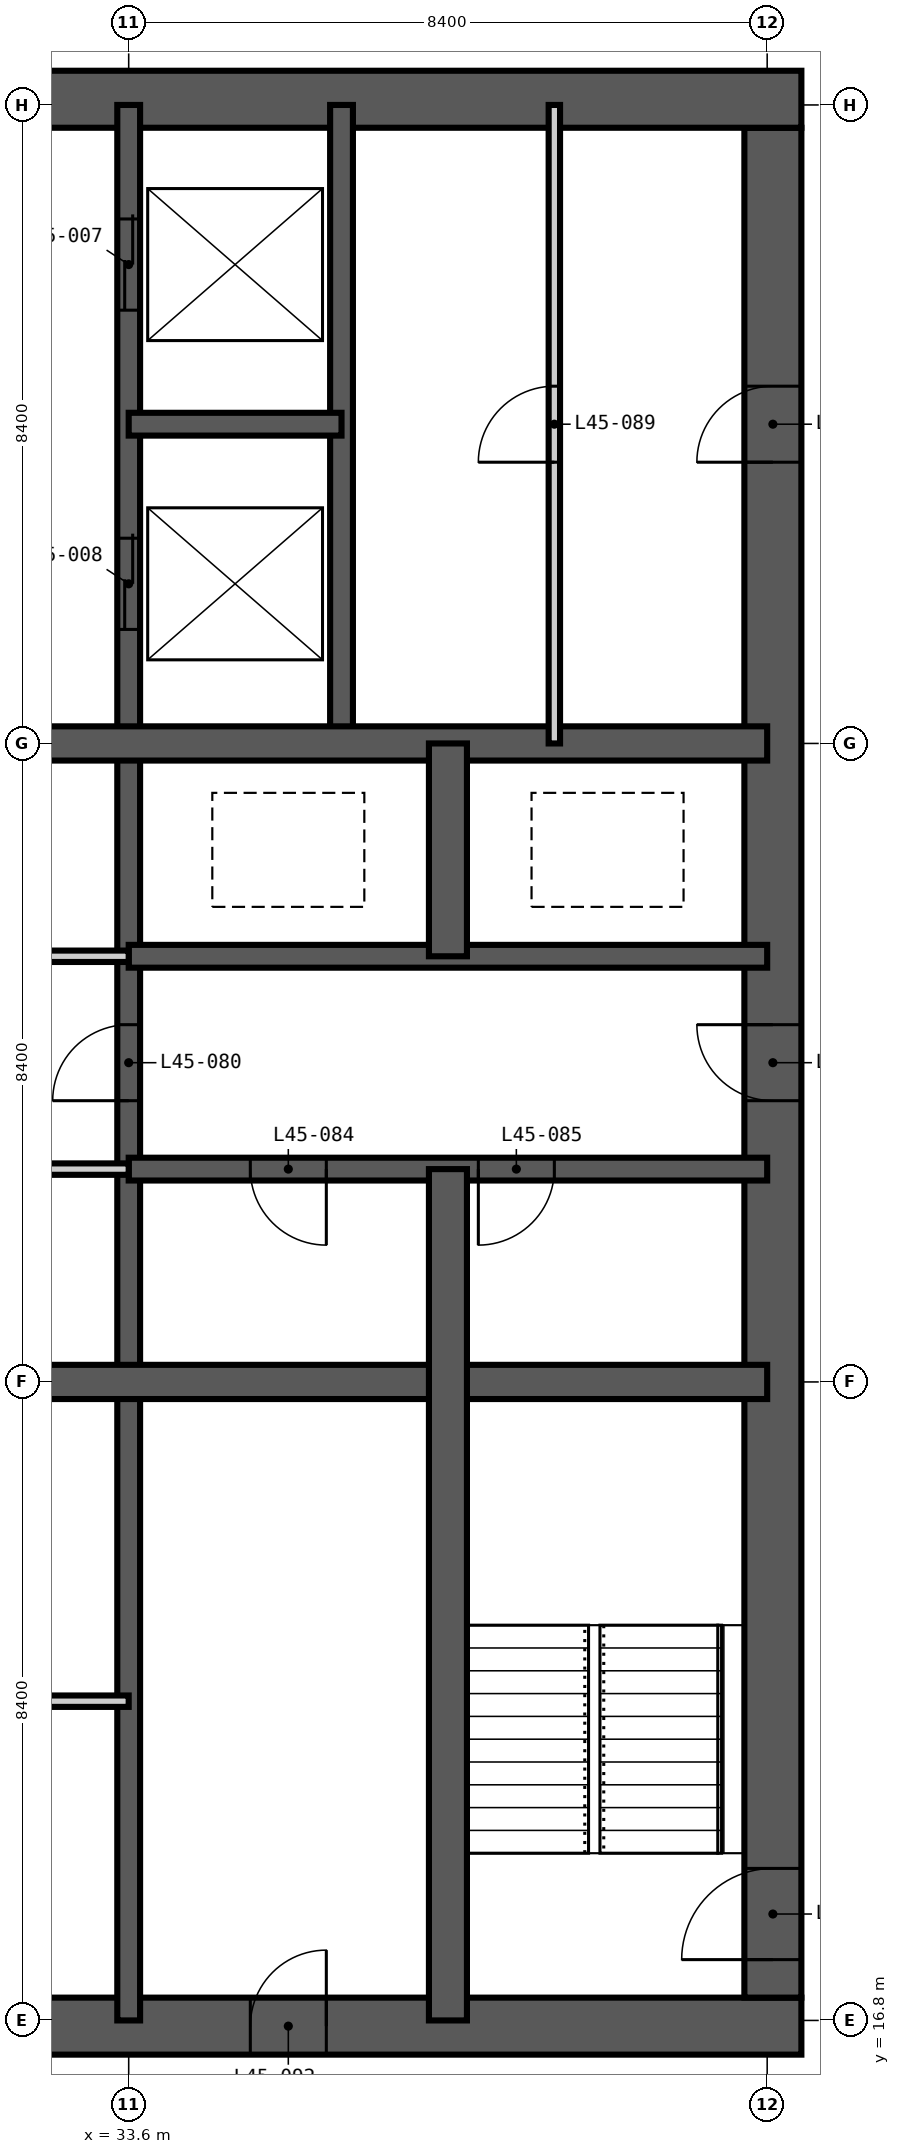
"""IFC4 building model, lengths in metres.
Left out: names, types, materials, properties, quantities, classifications, styles, units other than length and angle.
Written with IfcOpenShell. Run it as: python <this file> out.ifc"""

import sys

from ifc_helpers import new_model, si_unit, direction, frame, frame_2d, origin, place, context, subcontext, project, spatial, rectangle, extrude, element, fill, save


model = new_model("IFC4")
c1 = context("Model", 3, precision=1e-05, world=origin(), true_north=direction((0.0, 1.0)))
c2 = subcontext(c1, "Body", "Model", "MODEL_VIEW")
j1 = project(units=[si_unit("LENGTHUNIT", "METRE"), si_unit("PLANEANGLEUNIT", "RADIAN")], contexts=[c1])
p1 = place(None, origin())
s1 = spatial("IfcSite", under=j1, at=p1, CompositionType="ELEMENT")
p2 = place(p1, origin())
s2 = spatial("IfcBuilding", under=s1, at=p2, CompositionType="ELEMENT")
p3 = place(p2, frame((0.0, 0.0, 177.0)))
s3 = spatial("IfcBuildingStorey", under=s2, at=p3, CompositionType="ELEMENT", Elevation=177.0)
p4 = place(p3, frame((16.35, 16.725, -0.35), z_axis=(0.0, 0.0, 1.0), x_axis=(1.0, 0.0, 0.0)))
e1 = element("IfcWall", 1, at=p4, inside=s3, PredefinedType="SHEAR", context=c2, shape_type="SweptSolid", body=[
    extrude(rectangle(XDim=26.1, YDim=0.75, at=frame_2d((13.05, 0.0))), origin(), (0.0, 0.0, 1.0), 3.6),
])
p5 = place(p4, frame((12.55, 0.0, 0.35)))
e2 = element("IfcOpeningElement", 2, at=p5, cuts=e1, PredefinedType="OPENING", context=c2, shape_type="SweptSolid", body=[
    extrude(rectangle(XDim=1.0, YDim=2.1, at=frame_2d((0.5, 1.05))), frame((0.0, 0.385, 0.0), z_axis=(0.0, -1.0, 0.0), x_axis=(1.0, 0.0, 0.0)), (0.0, 0.0, 1.0), 0.77),
])
p6 = place(p4, frame((18.85, 0.0, 0.35)))
e3 = element("IfcOpeningElement", 3, at=p6, cuts=e1, PredefinedType="OPENING", context=c2, shape_type="SweptSolid", body=[
    extrude(rectangle(XDim=1.0, YDim=2.1, at=frame_2d((0.5, 1.05))), frame((0.0, 0.385, 0.0), z_axis=(0.0, -1.0, 0.0), x_axis=(1.0, 0.0, 0.0)), (0.0, 0.0, 1.0), 0.77),
])
p7 = place(p3, frame((42.075, 17.1, -0.35), z_axis=(0.0, 0.0, 1.0), x_axis=(0.0, 1.0, 0.0)))
e4 = element("IfcWall", 4, at=p7, inside=s3, PredefinedType="SHEAR", context=c2, shape_type="SweptSolid", body=[
    extrude(rectangle(XDim=24.6, YDim=0.75, at=frame_2d((12.3, 0.0))), origin(), (0.0, 0.0, 1.0), 3.6),
])
p8 = place(p7, frame((0.5, 0.0, 0.35)))
e5 = element("IfcOpeningElement", 5, at=p8, cuts=e4, PredefinedType="OPENING", context=c2, shape_type="SweptSolid", body=[
    extrude(rectangle(XDim=1.2, YDim=2.2, at=frame_2d((0.6, 1.1))), frame((0.0, 0.385, 0.0), z_axis=(0.0, -1.0, 0.0), x_axis=(1.0, 0.0, 0.0)), (0.0, 0.0, 1.0), 0.77),
])
p9 = place(p7, frame((11.8, 0.0, 0.35)))
e6 = element("IfcOpeningElement", 6, at=p9, cuts=e4, PredefinedType="OPENING", context=c2, shape_type="SweptSolid", body=[
    extrude(rectangle(XDim=1.0, YDim=2.1, at=frame_2d((0.5, 1.05))), frame((0.0, 0.385, 0.0), z_axis=(0.0, -1.0, 0.0), x_axis=(1.0, 0.0, 0.0)), (0.0, 0.0, 1.0), 0.77),
])
p10 = place(p7, frame((20.2, 0.0, 0.35)))
e7 = element("IfcOpeningElement", 7, at=p10, cuts=e4, PredefinedType="OPENING", context=c2, shape_type="SweptSolid", body=[
    extrude(rectangle(XDim=1.0, YDim=2.1, at=frame_2d((0.5, 1.05))), frame((0.0, 0.385, 0.0), z_axis=(0.0, -1.0, 0.0), x_axis=(1.0, 0.0, 0.0)), (0.0, 0.0, 1.0), 0.77),
])
p11 = place(p3, frame((42.45, 42.075, -0.35), z_axis=(0.0, 0.0, 1.0), x_axis=(-1.0, 0.0, 0.0)))
e8 = element("IfcWall", 8, at=p11, inside=s3, PredefinedType="SHEAR", context=c2, shape_type="SweptSolid", body=[
    extrude(rectangle(XDim=26.1, YDim=0.75, at=frame_2d((13.05, 0.0))), origin(), (0.0, 0.0, 1.0), 3.6),
])
p12 = place(p11, frame((20.95, 0.0, 0.35)))
e9 = element("IfcOpeningElement", 9, at=p12, cuts=e8, PredefinedType="OPENING", context=c2, shape_type="SweptSolid", body=[
    extrude(rectangle(XDim=1.0, YDim=2.1, at=frame_2d((0.5, 1.05))), frame((0.0, 0.385, 0.0), z_axis=(0.0, -1.0, 0.0), x_axis=(1.0, 0.0, 0.0)), (0.0, 0.0, 1.0), 0.77),
])
p13 = place(p11, frame((10.35, 0.0, 0.35)))
e10 = element("IfcOpeningElement", 10, at=p13, cuts=e8, PredefinedType="OPENING", context=c2, shape_type="SweptSolid", body=[
    extrude(rectangle(XDim=1.2, YDim=2.2, at=frame_2d((0.6, 1.1))), frame((0.0, 0.385, 0.0), z_axis=(0.0, -1.0, 0.0), x_axis=(1.0, 0.0, 0.0)), (0.0, 0.0, 1.0), 0.77),
])
p14 = place(p3, frame((33.6, 16.8, -0.35), z_axis=(0.0, 0.0, 1.0), x_axis=(0.0, 1.0, 0.0)))
e11 = element("IfcWall", 11, at=p14, inside=s3, PredefinedType="SHEAR", context=c2, shape_type="SweptSolid", body=[
    extrude(rectangle(XDim=25.2, YDim=0.3, at=frame_2d((12.6, 0.0))), origin(), (0.0, 0.0, 1.0), 3.6),
])
p15 = place(p14, frame((22.5, 0.0, 0.35)))
e12 = element("IfcOpeningElement", 12, at=p15, cuts=e11, PredefinedType="OPENING", context=c2, shape_type="SweptSolid", body=[
    extrude(rectangle(XDim=1.2, YDim=2.2, at=frame_2d((0.6, 1.1))), frame((0.0, 0.16, 0.0), z_axis=(0.0, -1.0, 0.0), x_axis=(1.0, 0.0, 0.0)), (0.0, 0.0, 1.0), 0.32),
])
p16 = place(p14, frame((18.3, 0.0, 0.35)))
e13 = element("IfcOpeningElement", 13, at=p16, cuts=e11, PredefinedType="OPENING", context=c2, shape_type="SweptSolid", body=[
    extrude(rectangle(XDim=1.2, YDim=2.2, at=frame_2d((0.6, 1.1))), frame((0.0, 0.16, 0.0), z_axis=(0.0, -1.0, 0.0), x_axis=(1.0, 0.0, 0.0)), (0.0, 0.0, 1.0), 0.32),
])
p17 = place(p14, frame((12.1, 0.0, 0.35)))
e14 = element("IfcOpeningElement", 14, at=p17, cuts=e11, PredefinedType="OPENING", context=c2, shape_type="SweptSolid", body=[
    extrude(rectangle(XDim=1.0, YDim=2.1, at=frame_2d((0.5, 1.05))), frame((0.0, 0.16, 0.0), z_axis=(0.0, -1.0, 0.0), x_axis=(1.0, 0.0, 0.0)), (0.0, 0.0, 1.0), 0.32),
])
p18 = place(p3, frame((36.4, 33.6, -0.35), z_axis=(0.0, 0.0, 1.0), x_axis=(0.0, 1.0, 0.0)))
e15 = element("IfcWall", 15, at=p18, inside=s3, PredefinedType="SHEAR", context=c2, shape_type="SweptSolid", body=[
    extrude(rectangle(XDim=8.4, YDim=0.3, at=frame_2d((4.2, 0.0))), origin(), (0.0, 0.0, 1.0), 3.6),
])
p19 = place(p3, frame((33.6, 28.0, -0.35), z_axis=(0.0, 0.0, 1.0), x_axis=(1.0, 0.0, 0.0)))
e16 = element("IfcWall", 16, at=p19, inside=s3, PredefinedType="SHEAR", context=c2, shape_type="SweptSolid", body=[
    extrude(rectangle(XDim=8.4, YDim=0.3, at=frame_2d((4.2, 0.0))), origin(), (0.0, 0.0, 1.0), 3.6),
])
p20 = place(p19, frame((1.6, 0.0, 0.35)))
e17 = element("IfcOpeningElement", 17, at=p20, cuts=e16, PredefinedType="OPENING", context=c2, shape_type="SweptSolid", body=[
    extrude(rectangle(XDim=1.0, YDim=2.1, at=frame_2d((0.5, 1.05))), frame((0.0, 0.16, 0.0), z_axis=(0.0, -1.0, 0.0), x_axis=(1.0, 0.0, 0.0)), (0.0, 0.0, 1.0), 0.32),
])
p21 = place(p19, frame((4.6, 0.0, 0.35)))
e18 = element("IfcOpeningElement", 18, at=p21, cuts=e16, PredefinedType="OPENING", context=c2, shape_type="SweptSolid", body=[
    extrude(rectangle(XDim=1.0, YDim=2.1, at=frame_2d((0.5, 1.05))), frame((0.0, 0.16, 0.0), z_axis=(0.0, -1.0, 0.0), x_axis=(1.0, 0.0, 0.0)), (0.0, 0.0, 1.0), 0.32),
])
p22 = place(p3, frame((33.6, 30.8, -0.35), z_axis=(0.0, 0.0, 1.0), x_axis=(1.0, 0.0, 0.0)))
e19 = element("IfcWall", 19, at=p22, inside=s3, PredefinedType="SHEAR", context=c2, shape_type="SweptSolid", body=[
    extrude(rectangle(XDim=8.4, YDim=0.3, at=frame_2d((4.2, 0.0))), origin(), (0.0, 0.0, 1.0), 3.6),
])
p23 = place(p3, frame((33.6, 37.8, -0.35), z_axis=(0.0, 0.0, 1.0), x_axis=(1.0, 0.0, 0.0)))
e20 = element("IfcWall", 20, at=p23, inside=s3, PredefinedType="SHEAR", context=c2, shape_type="SweptSolid", body=[
    extrude(rectangle(XDim=2.8, YDim=0.3, at=frame_2d((1.4, 0.0))), origin(), (0.0, 0.0, 1.0), 3.6),
])
for number, where, z_axis, x_axis in (
    (21, (16.8, 25.2, -0.35), (0.0, 0.0, 1.0), (1.0, 0.0, 0.0)),
    (22, (16.8, 33.6, -0.35), (0.0, 0.0, 1.0), (1.0, 0.0, 0.0)),
):
    element("IfcWall", number, at=place(p3, frame(where, z_axis=z_axis, x_axis=x_axis)), inside=s3, PredefinedType="SHEAR", context=c2, shape_type="SweptSolid", body=[
        extrude(rectangle(XDim=25.2, YDim=0.45, at=frame_2d((12.6, 0.0))), origin(), (0.0, 0.0, 1.0), 3.6),
    ])
p24 = place(p3, frame((37.8, 16.8, -0.35), z_axis=(0.0, 0.0, 1.0), x_axis=(0.0, 1.0, 0.0)))
e23 = element("IfcWall", 23, at=p24, inside=s3, PredefinedType="SHEAR", context=c2, shape_type="SweptSolid", body=[
    extrude(rectangle(XDim=11.2, YDim=0.5, at=frame_2d((5.6, 0.0))), origin(), (0.0, 0.0, 1.0), 3.6),
])
p25 = place(p3, frame((37.8, 30.8, -0.35), z_axis=(0.0, 0.0, 1.0), x_axis=(0.0, 1.0, 0.0)))
e24 = element("IfcWall", 24, at=p25, inside=s3, PredefinedType="SHEAR", context=c2, shape_type="SweptSolid", body=[
    extrude(rectangle(XDim=2.8, YDim=0.5, at=frame_2d((1.4, 0.0))), origin(), (0.0, 0.0, 1.0), 3.6),
])
p26 = place(p3, frame((39.2, 33.6, 0.0), z_axis=(0.0, 0.0, 1.0), x_axis=(0.0, 1.0, 0.0)))
e25 = element("IfcWall", 25, at=p26, inside=s3, PredefinedType="PARTITIONING", context=c2, shape_type="SweptSolid", body=[
    extrude(rectangle(XDim=8.4, YDim=0.15, at=frame_2d((4.2, 0.0))), origin(), (0.0, 0.0, 1.0), 3.25),
])
p27 = place(p26, frame((3.7, 0.0, 0.0)))
e26 = element("IfcOpeningElement", 26, at=p27, cuts=e25, PredefinedType="OPENING", context=c2, shape_type="SweptSolid", body=[
    extrude(rectangle(XDim=1.0, YDim=2.1, at=frame_2d((0.5, 1.05))), frame((0.0, 0.085, 0.0), z_axis=(0.0, -1.0, 0.0), x_axis=(1.0, 0.0, 0.0)), (0.0, 0.0, 1.0), 0.17),
])
p28 = place(p3, frame((25.2, 21.0, 0.0), z_axis=(0.0, 0.0, 1.0), x_axis=(1.0, 0.0, 0.0)))
e27 = element("IfcWall", 27, at=p28, inside=s3, PredefinedType="PARTITIONING", context=c2, shape_type="SweptSolid", body=[
    extrude(rectangle(XDim=8.4, YDim=0.15, at=frame_2d((4.2, 0.0))), origin(), (0.0, 0.0, 1.0), 3.25),
])
p29 = place(p28, frame((3.7, 0.0, 0.0)))
e28 = element("IfcOpeningElement", 28, at=p29, cuts=e27, PredefinedType="OPENING", context=c2, shape_type="SweptSolid", body=[
    extrude(rectangle(XDim=1.0, YDim=2.1, at=frame_2d((0.5, 1.05))), frame((0.0, 0.085, 0.0), z_axis=(0.0, -1.0, 0.0), x_axis=(1.0, 0.0, 0.0)), (0.0, 0.0, 1.0), 0.17),
])
p30 = place(p3, frame((25.2, 28.0, 0.0), z_axis=(0.0, 0.0, 1.0), x_axis=(1.0, 0.0, 0.0)))
e29 = element("IfcWall", 29, at=p30, inside=s3, PredefinedType="PARTITIONING", context=c2, shape_type="SweptSolid", body=[
    extrude(rectangle(XDim=8.4, YDim=0.15, at=frame_2d((4.2, 0.0))), origin(), (0.0, 0.0, 1.0), 3.25),
])
p31 = place(p30, frame((5.8, 0.0, 0.0)))
e30 = element("IfcOpeningElement", 30, at=p31, cuts=e29, PredefinedType="OPENING", context=c2, shape_type="SweptSolid", body=[
    extrude(rectangle(XDim=1.0, YDim=2.1, at=frame_2d((0.5, 1.05))), frame((0.0, 0.085, 0.0), z_axis=(0.0, -1.0, 0.0), x_axis=(1.0, 0.0, 0.0)), (0.0, 0.0, 1.0), 0.17),
])
p32 = place(p30, frame((1.6, 0.0, 0.0)))
e31 = element("IfcOpeningElement", 31, at=p32, cuts=e29, PredefinedType="OPENING", context=c2, shape_type="SweptSolid", body=[
    extrude(rectangle(XDim=1.0, YDim=2.1, at=frame_2d((0.5, 1.05))), frame((0.0, 0.085, 0.0), z_axis=(0.0, -1.0, 0.0), x_axis=(1.0, 0.0, 0.0)), (0.0, 0.0, 1.0), 0.17),
])
p33 = place(p3, frame((25.2, 30.8, 0.0), z_axis=(0.0, 0.0, 1.0), x_axis=(1.0, 0.0, 0.0)))
e32 = element("IfcWall", 32, at=p33, inside=s3, PredefinedType="PARTITIONING", context=c2, shape_type="SweptSolid", body=[
    extrude(rectangle(XDim=8.4, YDim=0.15, at=frame_2d((4.2, 0.0))), origin(), (0.0, 0.0, 1.0), 3.25),
])
p34 = place(p33, frame((3.7, 0.0, 0.0)))
e33 = element("IfcOpeningElement", 33, at=p34, cuts=e32, PredefinedType="OPENING", context=c2, shape_type="SweptSolid", body=[
    extrude(rectangle(XDim=1.0, YDim=2.1, at=frame_2d((0.5, 1.05))), frame((0.0, 0.085, 0.0), z_axis=(0.0, -1.0, 0.0), x_axis=(1.0, 0.0, 0.0)), (0.0, 0.0, 1.0), 0.17),
])
p35 = place(p8, origin())
e34 = element("IfcDoor", 34, at=p35, inside=s3, OperationType="SINGLE_SWING_LEFT", PredefinedType="DOOR", context=c2, shape_type="SweptSolid", body=[
    extrude(rectangle(XDim=1.2, YDim=2.2, at=frame_2d((0.6, 1.1))), frame((0.0, 0.025, 0.0), z_axis=(0.0, -1.0, 0.0), x_axis=(1.0, 0.0, 0.0)), (0.0, 0.0, 1.0), 0.05),
])
fill(e5, e34)
p36 = place(p15, origin())
e35 = element("IfcDoor", 35, at=p36, inside=s3, OperationType="DOUBLE_DOOR_SLIDING", PredefinedType="DOOR", context=c2, shape_type="SweptSolid", body=[
    extrude(rectangle(XDim=1.2, YDim=2.2, at=frame_2d((0.6, 1.1))), frame((0.0, 0.025, 0.0), z_axis=(0.0, -1.0, 0.0), x_axis=(1.0, 0.0, 0.0)), (0.0, 0.0, 1.0), 0.05),
])
fill(e12, e35)
p37 = place(p16, origin())
e36 = element("IfcDoor", 36, at=p37, inside=s3, OperationType="DOUBLE_DOOR_SLIDING", PredefinedType="DOOR", context=c2, shape_type="SweptSolid", body=[
    extrude(rectangle(XDim=1.2, YDim=2.2, at=frame_2d((0.6, 1.1))), frame((0.0, 0.025, 0.0), z_axis=(0.0, -1.0, 0.0), x_axis=(1.0, 0.0, 0.0)), (0.0, 0.0, 1.0), 0.05),
])
fill(e13, e36)
p38 = place(p17, origin())
e37 = element("IfcDoor", 37, at=p38, inside=s3, OperationType="SINGLE_SWING_LEFT", PredefinedType="DOOR", context=c2, shape_type="SweptSolid", body=[
    extrude(rectangle(XDim=1.0, YDim=2.1, at=frame_2d((0.5, 1.05))), frame((0.0, 0.025, 0.0), z_axis=(0.0, -1.0, 0.0), x_axis=(1.0, 0.0, 0.0)), (0.0, 0.0, 1.0), 0.05),
])
fill(e14, e37)
p39 = place(p20, frame((1.0, 0.0, 0.0), z_axis=(0.0, 0.0, 1.0), x_axis=(-1.0, 0.0, 0.0)))
e38 = element("IfcDoor", 38, at=p39, inside=s3, OperationType="SINGLE_SWING_LEFT", PredefinedType="DOOR", context=c2, shape_type="SweptSolid", body=[
    extrude(rectangle(XDim=1.0, YDim=2.1, at=frame_2d((0.5, 1.05))), frame((0.0, 0.025, 0.0), z_axis=(0.0, -1.0, 0.0), x_axis=(1.0, 0.0, 0.0)), (0.0, 0.0, 1.0), 0.05),
])
fill(e17, e38)
p40 = place(p21, frame((1.0, 0.0, 0.0), z_axis=(0.0, 0.0, 1.0), x_axis=(-1.0, 0.0, 0.0)))
e39 = element("IfcDoor", 39, at=p40, inside=s3, OperationType="SINGLE_SWING_RIGHT", PredefinedType="DOOR", context=c2, shape_type="SweptSolid", body=[
    extrude(rectangle(XDim=1.0, YDim=2.1, at=frame_2d((0.5, 1.05))), frame((0.0, 0.025, 0.0), z_axis=(0.0, -1.0, 0.0), x_axis=(1.0, 0.0, 0.0)), (0.0, 0.0, 1.0), 0.05),
])
fill(e18, e39)
p41 = place(p9, origin())
e40 = element("IfcDoor", 40, at=p41, inside=s3, OperationType="SINGLE_SWING_RIGHT", PredefinedType="DOOR", context=c2, shape_type="SweptSolid", body=[
    extrude(rectangle(XDim=1.0, YDim=2.1, at=frame_2d((0.5, 1.05))), frame((0.0, 0.025, 0.0), z_axis=(0.0, -1.0, 0.0), x_axis=(1.0, 0.0, 0.0)), (0.0, 0.0, 1.0), 0.05),
])
fill(e6, e40)
p42 = place(p10, origin())
e41 = element("IfcDoor", 41, at=p42, inside=s3, OperationType="SINGLE_SWING_LEFT", PredefinedType="DOOR", context=c2, shape_type="SweptSolid", body=[
    extrude(rectangle(XDim=1.0, YDim=2.1, at=frame_2d((0.5, 1.05))), frame((0.0, 0.025, 0.0), z_axis=(0.0, -1.0, 0.0), x_axis=(1.0, 0.0, 0.0)), (0.0, 0.0, 1.0), 0.05),
])
fill(e7, e41)
p43 = place(p27, origin())
e42 = element("IfcDoor", 42, at=p43, inside=s3, OperationType="SINGLE_SWING_LEFT", PredefinedType="DOOR", context=c2, shape_type="SweptSolid", body=[
    extrude(rectangle(XDim=1.0, YDim=2.1, at=frame_2d((0.5, 1.05))), frame((0.0, 0.025, 0.0), z_axis=(0.0, -1.0, 0.0), x_axis=(1.0, 0.0, 0.0)), (0.0, 0.0, 1.0), 0.05),
])
fill(e26, e42)
p44 = place(p6, origin())
e43 = element("IfcDoor", 43, at=p44, inside=s3, OperationType="SINGLE_SWING_RIGHT", PredefinedType="DOOR", context=c2, shape_type="SweptSolid", body=[
    extrude(rectangle(XDim=1.0, YDim=2.1, at=frame_2d((0.5, 1.05))), frame((0.0, 0.025, 0.0), z_axis=(0.0, -1.0, 0.0), x_axis=(1.0, 0.0, 0.0)), (0.0, 0.0, 1.0), 0.05),
])
fill(e3, e43)
save(model, sys.argv[1])
